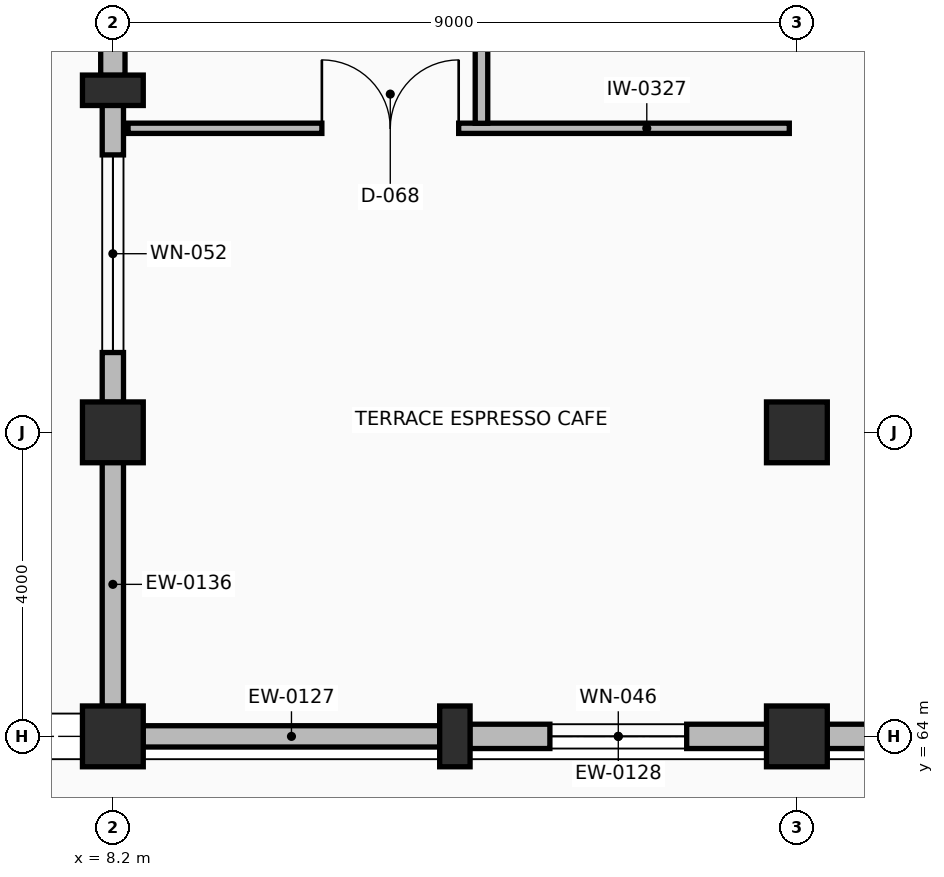
"""IFC4 building model, lengths in metres.
Left out: names, types, materials, properties, quantities, classifications, styles, units other than length and angle.
Written with IfcOpenShell. Run it as: python <this file> out.ifc"""

import sys

from ifc_helpers import new_model, si_unit, direction, frame, frame_2d, origin, origin_2d, place, context, subcontext, project, spatial, rectangle, extrude, element, fill, save


model = new_model("IFC4")
c1 = context("Model", 3, precision=1e-05, world=origin(), true_north=direction((0.0, 1.0)))
c2 = subcontext(c1, "Body", "Model", "MODEL_VIEW")
j1 = project(units=[si_unit("LENGTHUNIT", "METRE"), si_unit("PLANEANGLEUNIT", "RADIAN")], contexts=[c1])
p1 = place(None, origin())
s1 = spatial("IfcSite", under=j1, at=p1, CompositionType="ELEMENT")
p2 = place(p1, origin())
s2 = spatial("IfcBuilding", under=s1, at=p2, CompositionType="ELEMENT")
p3 = place(p2, origin())
s3 = spatial("IfcBuildingStorey", under=s2, at=p3, CompositionType="ELEMENT", Elevation=0.0)
for number, where, z_axis, x_axis in (
    (1, (8.2, 64.0, 0.0), (0.0, 0.0, 1.0), (1.0, 0.0, 0.0)),
    (2, (8.2, 68.0, 0.0), (0.0, 0.0, 1.0), (1.0, 0.0, 0.0)),
    (3, (17.2, 64.0, 0.0), (0.0, 0.0, 1.0), (1.0, 0.0, 0.0)),
    (4, (17.2, 68.0, 0.0), (0.0, 0.0, 1.0), (1.0, 0.0, 0.0)),
):
    element("IfcColumn", number, at=place(p3, frame(where, z_axis=z_axis, x_axis=x_axis)), inside=s3, PredefinedType="COLUMN", context=c2, shape_type="SweptSolid", body=[
        extrude(rectangle(XDim=0.8, YDim=0.8, at=origin_2d()), origin(), (0.0, 0.0, 1.0), 4.8),
    ])
for number, where, z_axis, x_axis in (
    (5, (12.7, 64.0, 0.0), (0.0, 0.0, 1.0), (1.0, 0.0, 0.0)),
    (6, (8.2, 72.5, 0.0), (0.0, 0.0, 1.0), (0.0, 1.0, 0.0)),
):
    element("IfcColumn", number, at=place(p3, frame(where, z_axis=z_axis, x_axis=x_axis)), inside=s3, PredefinedType="PILASTER", context=c2, shape_type="SweptSolid", body=[
        extrude(rectangle(XDim=0.4, YDim=0.8, at=origin_2d()), origin(), (0.0, 0.0, 1.0), 4.8),
    ])
p4 = place(p3, frame((8.595, 64.0, 0.0), z_axis=(0.0, 0.0, 1.0), x_axis=(1.0, 0.0, 0.0)))
e7 = element("IfcWall", 7, at=p4, inside=s3, PredefinedType="SOLIDWALL", context=c2, shape_type="SweptSolid", body=[
    extrude(rectangle(XDim=3.91, YDim=0.28, at=frame_2d((1.955, 0.0))), origin(), (0.0, 0.0, 1.0), 2.648),
])
p5 = place(p3, frame((12.895, 64.0, 0.0), z_axis=(0.0, 0.0, 1.0), x_axis=(1.0, 0.0, 0.0)))
e8 = element("IfcWall", 8, at=p5, inside=s3, PredefinedType="SOLIDWALL", context=c2, shape_type="SweptSolid", body=[
    extrude(rectangle(XDim=3.91, YDim=0.32, at=frame_2d((1.955, 0.0))), origin(), (0.0, 0.0, 1.0), 2.648),
])
p6 = place(p5, frame((1.055, 0.0, 0.9)))
e9 = element("IfcOpeningElement", 9, at=p6, cuts=e8, PredefinedType="OPENING", context=c2, shape_type="SweptSolid", body=[
    extrude(rectangle(XDim=1.8, YDim=1.6, at=frame_2d((0.9, 0.8))), frame((0.0, 0.17, 0.0), z_axis=(0.0, -1.0, 0.0), x_axis=(1.0, 0.0, 0.0)), (0.0, 0.0, 1.0), 0.34),
])
p7 = place(p3, frame((17.595, 64.0, 0.0), z_axis=(0.0, 0.0, 1.0), x_axis=(1.0, 0.0, 0.0)))
e10 = element("IfcWall", 10, at=p7, inside=s3, PredefinedType="SOLIDWALL", context=c2, shape_type="SweptSolid", body=[
    extrude(rectangle(XDim=3.91, YDim=0.32, at=frame_2d((1.955, 0.0))), origin(), (0.0, 0.0, 1.0), 2.648),
])
p8 = place(p3, frame((8.2, 67.605, 0.0), z_axis=(0.0, 0.0, 1.0), x_axis=(0.0, -1.0, 0.0)))
e11 = element("IfcWall", 11, at=p8, inside=s3, PredefinedType="SOLIDWALL", context=c2, shape_type="SweptSolid", body=[
    extrude(rectangle(XDim=3.21, YDim=0.28, at=frame_2d((1.605, 0.0))), origin(), (0.0, 0.0, 1.0), 4.135),
])
p9 = place(p3, frame((8.2, 76.605, 0.0), z_axis=(0.0, 0.0, 1.0), x_axis=(0.0, -1.0, 0.0)))
e12 = element("IfcWall", 12, at=p9, inside=s3, PredefinedType="SOLIDWALL", context=c2, shape_type="SweptSolid", body=[
    extrude(rectangle(XDim=3.91, YDim=0.32, at=frame_2d((1.955, 0.0))), origin(), (0.0, 0.0, 1.0), 4.135),
])
p10 = place(p9, frame((1.405, 0.0, 0.0)))
e13 = element("IfcOpeningElement", 13, at=p10, cuts=e12, PredefinedType="OPENING", context=c2, shape_type="SweptSolid", body=[
    extrude(rectangle(XDim=1.1, YDim=2.2, at=frame_2d((0.55, 1.1))), frame((0.0, 0.17, 0.0), z_axis=(0.0, -1.0, 0.0), x_axis=(1.0, 0.0, 0.0)), (0.0, 0.0, 1.0), 0.34),
])
p11 = place(p3, frame((8.2, 72.305, 0.0), z_axis=(0.0, 0.0, 1.0), x_axis=(0.0, -1.0, 0.0)))
e14 = element("IfcWall", 14, at=p11, inside=s3, PredefinedType="SOLIDWALL", context=c2, shape_type="SweptSolid", body=[
    extrude(rectangle(XDim=3.91, YDim=0.28, at=frame_2d((1.955, 0.0))), origin(), (0.0, 0.0, 1.0), 4.135),
])
p12 = place(p11, frame((0.655, 0.0, 0.9)))
e15 = element("IfcOpeningElement", 15, at=p12, cuts=e14, PredefinedType="OPENING", context=c2, shape_type="SweptSolid", body=[
    extrude(rectangle(XDim=2.6, YDim=1.55, at=frame_2d((1.3, 0.775))), frame((0.0, 0.15, 0.0), z_axis=(0.0, -1.0, 0.0), x_axis=(1.0, 0.0, 0.0)), (0.0, 0.0, 1.0), 0.3),
])
p13 = place(p3, frame((8.4, 72.0, 0.0), z_axis=(0.0, 0.0, 1.0), x_axis=(1.0, 0.0, 0.0)))
e16 = element("IfcWall", 16, at=p13, inside=s3, PredefinedType="PARTITIONING", context=c2, shape_type="SweptSolid", body=[
    extrude(rectangle(XDim=8.7, YDim=0.135, at=frame_2d((4.35, 0.0))), origin(), (0.0, 0.0, 1.0), 3.737),
])
p14 = place(p13, frame((2.55, 0.0, 0.0)))
e17 = element("IfcOpeningElement", 17, at=p14, cuts=e16, PredefinedType="OPENING", context=c2, shape_type="SweptSolid", body=[
    extrude(rectangle(XDim=1.8, YDim=2.3, at=frame_2d((0.9, 1.15))), frame((0.0, 0.077, 0.0), z_axis=(0.0, -1.0, 0.0), x_axis=(1.0, 0.0, 0.0)), (0.0, 0.0, 1.0), 0.155),
])
p15 = place(p3, frame((13.05, 72.066, 0.0), z_axis=(0.0, 0.0, 1.0), x_axis=(0.0, 1.0, 0.0)))
e18 = element("IfcWall", 18, at=p15, inside=s3, PredefinedType="PARTITIONING", context=c2, shape_type="SweptSolid", body=[
    extrude(rectangle(XDim=5.221, YDim=0.165, at=frame_2d((2.611, 0.0))), origin(), (0.0, 0.0, 1.0), 3.737),
])
p16 = place(p15, frame((2.086, 0.0, 0.0)))
e19 = element("IfcOpeningElement", 19, at=p16, cuts=e18, PredefinedType="OPENING", context=c2, shape_type="SweptSolid", body=[
    extrude(rectangle(XDim=1.05, YDim=2.15, at=frame_2d((0.525, 1.075))), frame((0.0, 0.093, 0.0), z_axis=(0.0, -1.0, 0.0), x_axis=(1.0, 0.0, 0.0)), (0.0, 0.0, 1.0), 0.185),
])
p17 = place(p6, origin())
e20 = element("IfcWindow", 20, at=p17, inside=s3, PartitioningType="SINGLE_PANEL", PredefinedType="WINDOW", context=c2, shape_type="SweptSolid", body=[
    extrude(rectangle(XDim=1.8, YDim=1.6, at=frame_2d((0.9, 0.8))), frame((0.0, 0.03, 0.0), z_axis=(0.0, -1.0, 0.0), x_axis=(1.0, 0.0, 0.0)), (0.0, 0.0, 1.0), 0.06),
])
fill(e9, e20)
p18 = place(p12, origin())
e21 = element("IfcWindow", 21, at=p18, inside=s3, PartitioningType="SINGLE_PANEL", PredefinedType="WINDOW", context=c2, shape_type="SweptSolid", body=[
    extrude(rectangle(XDim=2.6, YDim=1.55, at=frame_2d((1.3, 0.775))), frame((0.0, 0.03, 0.0), z_axis=(0.0, -1.0, 0.0), x_axis=(1.0, 0.0, 0.0)), (0.0, 0.0, 1.0), 0.06),
])
fill(e15, e21)
p19 = place(p14, origin())
e22 = element("IfcDoor", 22, at=p19, inside=s3, OperationType="DOUBLE_SWING_LEFT", PredefinedType="DOOR", context=c2, shape_type="SweptSolid", body=[
    extrude(rectangle(XDim=1.8, YDim=2.3, at=frame_2d((0.9, 1.15))), frame((0.0, 0.025, 0.0), z_axis=(0.0, -1.0, 0.0), x_axis=(1.0, 0.0, 0.0)), (0.0, 0.0, 1.0), 0.05),
])
fill(e17, e22)
save(model, sys.argv[1])
